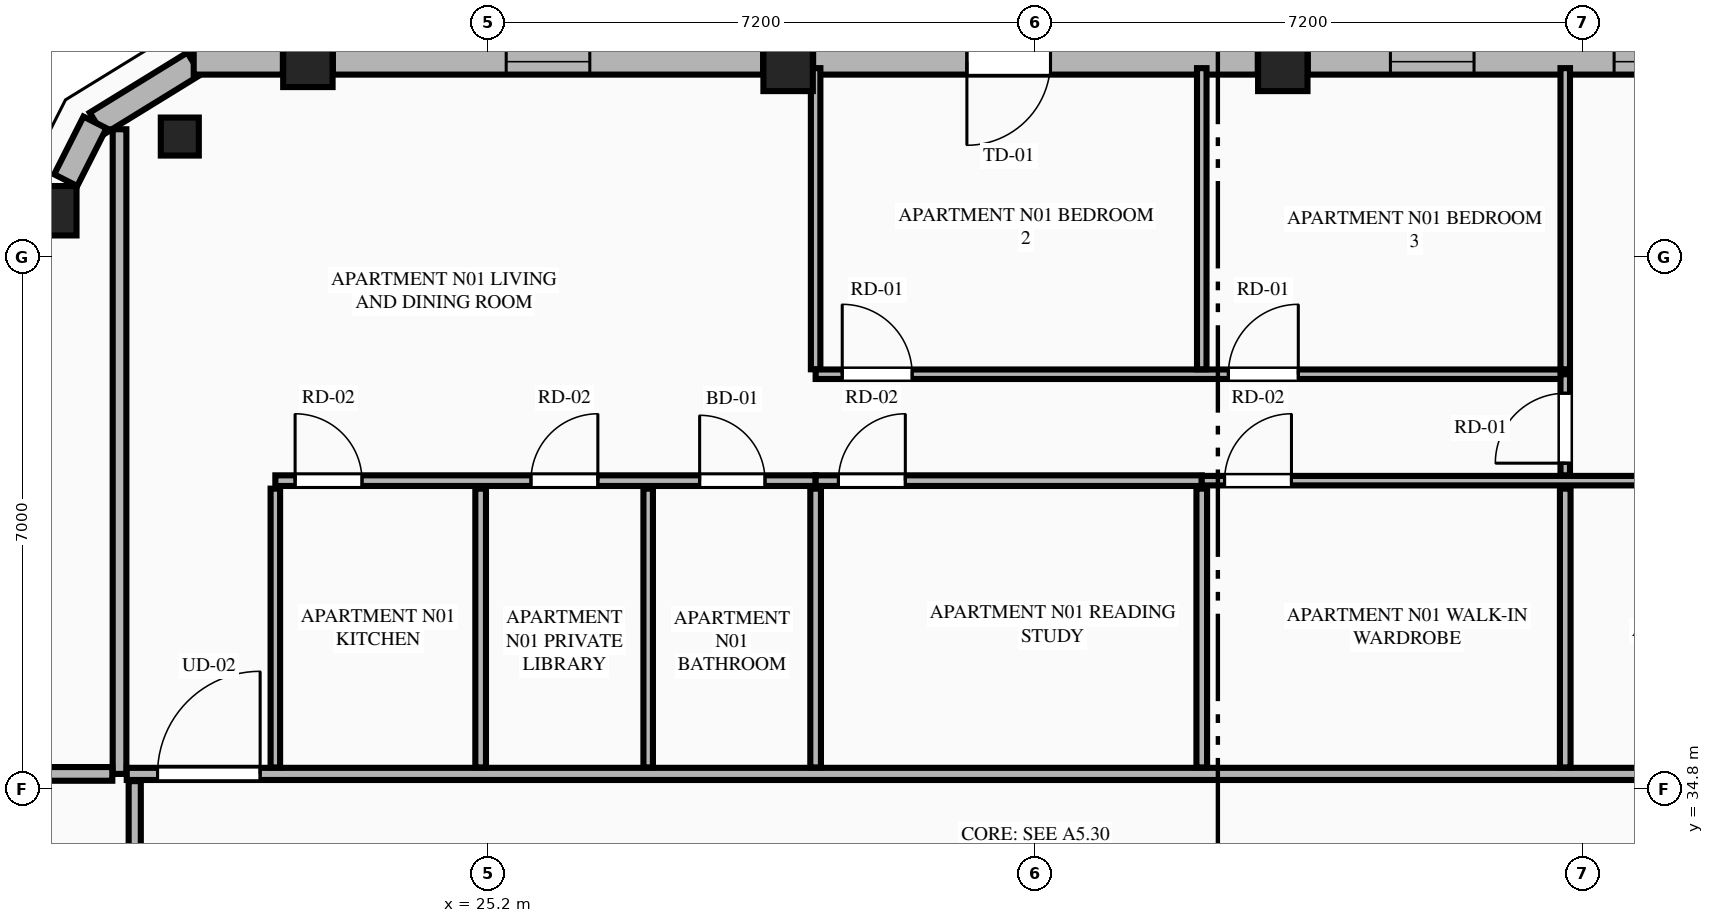
"""IFC4 building model, lengths in metres.
Left out: names, types, materials, properties, quantities, classifications, styles, units other than length and angle.
Written with IfcOpenShell. Run it as: python <this file> out.ifc"""

import sys

from ifc_helpers import new_model, si_unit, direction, frame, frame_2d, origin, origin_2d, place, context, subcontext, project, spatial, rectangle, extrude, element, fill, save


model = new_model("IFC4")
c1 = context("Model", 3, precision=1e-05, world=origin(), true_north=direction((0.0, 1.0)))
c2 = subcontext(c1, "Body", "Model", "MODEL_VIEW")
j1 = project(units=[si_unit("LENGTHUNIT", "METRE"), si_unit("PLANEANGLEUNIT", "RADIAN")], contexts=[c1])
p1 = place(None, origin())
s1 = spatial("IfcSite", under=j1, at=p1, CompositionType="ELEMENT")
p2 = place(p1, origin())
s2 = spatial("IfcBuilding", under=s1, at=p2, CompositionType="ELEMENT")
p3 = place(p2, frame((0.0, 0.0, 291.5)))
s3 = spatial("IfcBuildingStorey", under=s2, at=p3, CompositionType="ELEMENT", Elevation=291.5)
for number, where, z_axis, x_axis in (
    (1, (35.654, 44.308, 0.0), (0.0, 0.0, 1.0), (1.0, 0.0, 0.0)),
    (2, (29.146, 44.308, 0.0), (0.0, 0.0, 1.0), (1.0, 0.0, 0.0)),
    (3, (22.828, 44.361, 0.0), (0.0, 0.0, 1.0), (1.0, 0.0, 0.0)),
    (4, (19.459, 42.409, 0.0), (0.0, 0.0, 1.0), (1.0, 0.0, 0.0)),
):
    element("IfcColumn", number, at=place(p3, frame(where, z_axis=z_axis, x_axis=x_axis)), inside=s3, PredefinedType="COLUMN", context=c2, shape_type="SweptSolid", body=[
        extrude(rectangle(XDim=0.65, YDim=0.65, at=origin_2d()), origin(), (0.0, 0.0, 1.0), 4.0),
    ])
p4 = place(p3, frame((21.143, 43.385, 0.0), z_axis=(0.0, 0.0, 1.0), x_axis=(-0.865256437757, -0.501329529272, 0.0)))
e5 = element("IfcColumn", 5, at=p4, inside=s3, PredefinedType="PILASTER", context=c2, shape_type="SweptSolid", body=[
    extrude(rectangle(XDim=0.5, YDim=0.35, at=origin_2d()), origin(), (0.0, 0.0, 1.0), 4.0),
])
p5 = place(p3, frame((21.331, 44.345, 0.0), z_axis=(0.0, 0.0, 1.0), x_axis=(-0.851680557619, -0.52406128246, 0.0)))
e6 = element("IfcWall", 6, at=p5, inside=s3, PredefinedType="STANDARD", context=c2, shape_type="SweptSolid", body=[
    extrude(rectangle(XDim=1.508, YDim=0.34, at=frame_2d((0.754, 0.0))), origin(), (0.0, 0.0, 1.0), 3.8),
])
p6 = place(p3, frame((41.643, 44.37, 0.0), z_axis=(0.0, 0.0, 1.0), x_axis=(-1.0, 0.0, 0.0)))
e7 = element("IfcWall", 7, at=p6, inside=s3, PredefinedType="STANDARD", context=c2, shape_type="SweptSolid", body=[
    extrude(rectangle(XDim=5.66, YDim=0.34, at=frame_2d((2.83, 0.0))), origin(), (0.0, 0.0, 1.0), 2.99),
])
p7 = place(p6, frame((0.53, 0.0, 0.75)))
e8 = element("IfcOpeningElement", 8, at=p7, cuts=e7, PredefinedType="OPENING", context=c2, shape_type="SweptSolid", body=[
    extrude(rectangle(XDim=1.1, YDim=2.0, at=frame_2d((0.55, 1.0))), frame((0.0, 0.18, 0.0), z_axis=(0.0, -1.0, 0.0), x_axis=(1.0, 0.0, 0.0)), (0.0, 0.0, 1.0), 0.36),
])
p8 = place(p6, frame((3.473, 0.0, 0.75)))
e9 = element("IfcOpeningElement", 9, at=p8, cuts=e7, PredefinedType="OPENING", context=c2, shape_type="SweptSolid", body=[
    extrude(rectangle(XDim=1.1, YDim=2.0, at=frame_2d((0.55, 1.0))), frame((0.0, 0.18, 0.0), z_axis=(0.0, -1.0, 0.0), x_axis=(1.0, 0.0, 0.0)), (0.0, 0.0, 1.0), 0.36),
])
p9 = place(p3, frame((35.325, 44.37, 0.0), z_axis=(0.0, 0.0, 1.0), x_axis=(-1.0, 0.0, 0.0)))
e10 = element("IfcWall", 10, at=p9, inside=s3, PredefinedType="STANDARD", context=c2, shape_type="SweptSolid", body=[
    extrude(rectangle(XDim=5.85, YDim=0.34, at=frame_2d((2.925, 0.0))), origin(), (0.0, 0.0, 1.0), 2.99),
])
p10 = place(p9, frame((2.727, 0.0, 0.0)))
e11 = element("IfcOpeningElement", 11, at=p10, cuts=e10, PredefinedType="OPENING", context=c2, shape_type="SweptSolid", body=[
    extrude(rectangle(XDim=1.1, YDim=2.25, at=frame_2d((0.55, 1.125))), frame((0.0, 0.18, 0.0), z_axis=(0.0, -1.0, 0.0), x_axis=(1.0, 0.0, 0.0)), (0.0, 0.0, 1.0), 0.36),
])
p11 = place(p3, frame((28.817, 44.37, 0.0), z_axis=(0.0, 0.0, 1.0), x_axis=(-1.0, 0.0, 0.0)))
e12 = element("IfcWall", 12, at=p11, inside=s3, PredefinedType="STANDARD", context=c2, shape_type="SweptSolid", body=[
    extrude(rectangle(XDim=5.66, YDim=0.34, at=frame_2d((2.83, 0.0))), origin(), (0.0, 0.0, 1.0), 2.99),
])
p12 = place(p11, frame((2.28, 0.0, 0.75)))
e13 = element("IfcOpeningElement", 13, at=p12, cuts=e12, PredefinedType="OPENING", context=c2, shape_type="SweptSolid", body=[
    extrude(rectangle(XDim=1.1, YDim=2.0, at=frame_2d((0.55, 1.0))), frame((0.0, 0.18, 0.0), z_axis=(0.0, -1.0, 0.0), x_axis=(1.0, 0.0, 0.0)), (0.0, 0.0, 1.0), 0.36),
])
p13 = place(p3, frame((22.499, 44.37, 0.0), z_axis=(0.0, 0.0, 1.0), x_axis=(-1.0, 0.0, 0.0)))
e14 = element("IfcWall", 14, at=p13, inside=s3, PredefinedType="STANDARD", context=c2, shape_type="SweptSolid", body=[
    extrude(rectangle(XDim=1.173, YDim=0.34, at=frame_2d((0.586, 0.0))), origin(), (0.0, 0.0, 1.0), 3.8),
])
p14 = place(p3, frame((20.027, 43.571, 0.0), z_axis=(0.0, 0.0, 1.0), x_axis=(-0.451907025977, -0.8920650424, 0.0)))
e15 = element("IfcWall", 15, at=p14, inside=s3, PredefinedType="STANDARD", context=c2, shape_type="SweptSolid", body=[
    extrude(rectangle(XDim=0.852, YDim=0.34, at=frame_2d((0.426, 0.0))), origin(), (0.0, 0.0, 1.0), 3.8),
])
p15 = place(p3, frame((20.35, 35.0, 0.0), z_axis=(0.0, 0.0, 1.0), x_axis=(0.0, 1.0, 0.0)))
e16 = element("IfcWall", 16, at=p15, inside=s3, PredefinedType="PARTITIONING", context=c2, shape_type="SweptSolid", body=[
    extrude(rectangle(XDim=8.481, YDim=0.18, at=frame_2d((4.24, 0.0))), origin(), (0.0, 0.0, 1.0), 3.8),
])
p16 = place(p3, frame((20.445, 35.0, 0.0), z_axis=(0.0, 0.0, 1.0), x_axis=(1.0, 0.0, 0.0)))
e17 = element("IfcWall", 17, at=p16, inside=s3, PredefinedType="PARTITIONING", context=c2, shape_type="SweptSolid", body=[
    extrude(rectangle(XDim=23.91, YDim=0.16, at=frame_2d((11.955, 0.0))), origin(), (0.0, 0.0, 1.0), 3.8),
])
p17 = place(p16, frame((0.405, 0.0, 0.0)))
e18 = element("IfcOpeningElement", 18, at=p17, cuts=e17, PredefinedType="OPENING", context=c2, shape_type="SweptSolid", body=[
    extrude(rectangle(XDim=1.35, YDim=2.35, at=frame_2d((0.675, 1.175))), frame((0.0, 0.09, 0.0), z_axis=(0.0, -1.0, 0.0), x_axis=(1.0, 0.0, 0.0)), (0.0, 0.0, 1.0), 0.18),
])
p18 = place(p3, frame((22.4, 35.085, 0.0), z_axis=(0.0, 0.0, 1.0), x_axis=(0.0, 1.0, 0.0)))
e19 = element("IfcWall", 19, at=p18, inside=s3, PredefinedType="PARTITIONING", context=c2, shape_type="SweptSolid", body=[
    extrude(rectangle(XDim=3.668, YDim=0.125, at=frame_2d((1.834, 0.0))), origin(), (0.0, 0.0, 1.0), 3.8),
])
p19 = place(p3, frame((22.4, 38.858, 0.0), z_axis=(0.0, 0.0, 1.0), x_axis=(1.0, 0.0, 0.0)))
e20 = element("IfcWall", 20, at=p19, inside=s3, PredefinedType="PLUMBINGWALL", context=c2, shape_type="SweptSolid", body=[
    extrude(rectangle(XDim=7.108, YDim=0.14, at=frame_2d((3.554, 0.0))), origin(), (0.0, 0.0, 1.0), 3.8),
])
p20 = place(p19, frame((5.582, 0.0, 0.0)))
e21 = element("IfcOpeningElement", 21, at=p20, cuts=e20, PredefinedType="OPENING", context=c2, shape_type="SweptSolid", body=[
    extrude(rectangle(XDim=0.86, YDim=2.1, at=frame_2d((0.43, 1.05))), frame((0.0, 0.08, 0.0), z_axis=(0.0, -1.0, 0.0), x_axis=(1.0, 0.0, 0.0)), (0.0, 0.0, 1.0), 0.16),
])
p21 = place(p19, frame((0.26, 0.0, 0.0)))
e22 = element("IfcOpeningElement", 22, at=p21, cuts=e20, PredefinedType="OPENING", context=c2, shape_type="SweptSolid", body=[
    extrude(rectangle(XDim=0.88, YDim=2.15, at=frame_2d((0.44, 1.075))), frame((0.0, 0.08, 0.0), z_axis=(0.0, -1.0, 0.0), x_axis=(1.0, 0.0, 0.0)), (0.0, 0.0, 1.0), 0.16),
])
p22 = place(p19, frame((3.363, 0.0, 0.0)))
e23 = element("IfcOpeningElement", 23, at=p22, cuts=e20, PredefinedType="OPENING", context=c2, shape_type="SweptSolid", body=[
    extrude(rectangle(XDim=0.88, YDim=2.15, at=frame_2d((0.44, 1.075))), frame((0.0, 0.08, 0.0), z_axis=(0.0, -1.0, 0.0), x_axis=(1.0, 0.0, 0.0)), (0.0, 0.0, 1.0), 0.16),
])
p23 = place(p3, frame((29.508, 38.858, 0.0), z_axis=(0.0, 0.0, 1.0), x_axis=(1.0, 0.0, 0.0)))
e24 = element("IfcWall", 24, at=p23, inside=s3, PredefinedType="PLUMBINGWALL", context=c2, shape_type="SweptSolid", body=[
    extrude(rectangle(XDim=5.08, YDim=0.14, at=frame_2d((2.54, 0.0))), origin(), (0.0, 0.0, 1.0), 3.8),
])
p24 = place(p23, frame((0.3, 0.0, 0.0)))
e25 = element("IfcOpeningElement", 25, at=p24, cuts=e24, PredefinedType="OPENING", context=c2, shape_type="SweptSolid", body=[
    extrude(rectangle(XDim=0.88, YDim=2.15, at=frame_2d((0.44, 1.075))), frame((0.0, 0.08, 0.0), z_axis=(0.0, -1.0, 0.0), x_axis=(1.0, 0.0, 0.0)), (0.0, 0.0, 1.0), 0.16),
])
p25 = place(p3, frame((34.588, 38.858, 0.0), z_axis=(0.0, 0.0, 1.0), x_axis=(1.0, 0.0, 0.0)))
e26 = element("IfcWall", 26, at=p25, inside=s3, PredefinedType="PARTITIONING", context=c2, shape_type="SweptSolid", body=[
    extrude(rectangle(XDim=9.767, YDim=0.125, at=frame_2d((4.884, 0.0))), origin(), (0.0, 0.0, 1.0), 3.8),
])
p26 = place(p25, frame((6.849, 0.0, 0.0)))
e27 = element("IfcOpeningElement", 27, at=p26, cuts=e26, PredefinedType="OPENING", context=c2, shape_type="SweptSolid", body=[
    extrude(rectangle(XDim=0.86, YDim=2.1, at=frame_2d((0.43, 1.05))), frame((0.0, 0.073, 0.0), z_axis=(0.0, -1.0, 0.0), x_axis=(1.0, 0.0, 0.0)), (0.0, 0.0, 1.0), 0.145),
])
p27 = place(p25, frame((0.3, 0.0, 0.0)))
e28 = element("IfcOpeningElement", 28, at=p27, cuts=e26, PredefinedType="OPENING", context=c2, shape_type="SweptSolid", body=[
    extrude(rectangle(XDim=0.88, YDim=2.15, at=frame_2d((0.44, 1.075))), frame((0.0, 0.073, 0.0), z_axis=(0.0, -1.0, 0.0), x_axis=(1.0, 0.0, 0.0)), (0.0, 0.0, 1.0), 0.145),
])
p28 = place(p3, frame((25.101, 35.085, 0.0), z_axis=(0.0, 0.0, 1.0), x_axis=(0.0, 1.0, 0.0)))
e29 = element("IfcWall", 29, at=p28, inside=s3, PredefinedType="PLUMBINGWALL", context=c2, shape_type="SweptSolid", body=[
    extrude(rectangle(XDim=3.668, YDim=0.14, at=frame_2d((1.834, 0.0))), origin(), (0.0, 0.0, 1.0), 3.8),
])
p29 = place(p3, frame((27.305, 35.085, 0.0), z_axis=(0.0, 0.0, 1.0), x_axis=(0.0, 1.0, 0.0)))
e30 = element("IfcWall", 30, at=p29, inside=s3, PredefinedType="PARTITIONING", context=c2, shape_type="SweptSolid", body=[
    extrude(rectangle(XDim=3.668, YDim=0.125, at=frame_2d((1.834, 0.0))), origin(), (0.0, 0.0, 1.0), 3.8),
])
p30 = place(p3, frame((29.508, 40.323, 0.0), z_axis=(0.0, 0.0, 1.0), x_axis=(0.0, 1.0, 0.0)))
e31 = element("IfcWall", 31, at=p30, inside=s3, PredefinedType="PARTITIONING", context=c2, shape_type="SweptSolid", body=[
    extrude(rectangle(XDim=3.962, YDim=0.125, at=frame_2d((1.981, 0.0))), origin(), (0.0, 0.0, 1.0), 3.8),
])
p31 = place(p3, frame((29.508, 40.258, 0.0), z_axis=(0.0, 0.0, 1.0), x_axis=(1.0, 0.0, 0.0)))
e32 = element("IfcWall", 32, at=p31, inside=s3, PredefinedType="PARTITIONING", context=c2, shape_type="SweptSolid", body=[
    extrude(rectangle(XDim=9.862, YDim=0.125, at=frame_2d((4.931, 0.0))), origin(), (0.0, 0.0, 1.0), 3.487),
])
p32 = place(p31, frame((0.35, 0.0, 0.0)))
e33 = element("IfcOpeningElement", 33, at=p32, cuts=e32, PredefinedType="OPENING", context=c2, shape_type="SweptSolid", body=[
    extrude(rectangle(XDim=0.92, YDim=2.15, at=frame_2d((0.46, 1.075))), frame((0.0, 0.073, 0.0), z_axis=(0.0, -1.0, 0.0), x_axis=(1.0, 0.0, 0.0)), (0.0, 0.0, 1.0), 0.145),
])
p33 = place(p31, frame((5.43, 0.0, 0.0)))
e34 = element("IfcOpeningElement", 34, at=p33, cuts=e32, PredefinedType="OPENING", context=c2, shape_type="SweptSolid", body=[
    extrude(rectangle(XDim=0.92, YDim=2.15, at=frame_2d((0.46, 1.075))), frame((0.0, 0.073, 0.0), z_axis=(0.0, -1.0, 0.0), x_axis=(1.0, 0.0, 0.0)), (0.0, 0.0, 1.0), 0.145),
])
p34 = place(p3, frame((39.37, 38.928, 0.0), z_axis=(0.0, 0.0, 1.0), x_axis=(0.0, 1.0, 0.0)))
e35 = element("IfcWall", 35, at=p34, inside=s3, PredefinedType="PARTITIONING", context=c2, shape_type="SweptSolid", body=[
    extrude(rectangle(XDim=1.33, YDim=0.125, at=frame_2d((0.665, 0.0))), origin(), (0.0, 0.0, 1.0), 3.8),
])
p35 = place(p34, frame((0.16, 0.0, 0.0)))
e36 = element("IfcOpeningElement", 36, at=p35, cuts=e35, PredefinedType="OPENING", context=c2, shape_type="SweptSolid", body=[
    extrude(rectangle(XDim=0.92, YDim=2.15, at=frame_2d((0.46, 1.075))), frame((0.0, 0.073, 0.0), z_axis=(0.0, -1.0, 0.0), x_axis=(1.0, 0.0, 0.0)), (0.0, 0.0, 1.0), 0.145),
])
for number, where, z_axis, x_axis in (
    (37, (29.508, 35.085, 0.0), (0.0, 0.0, 1.0), (0.0, 1.0, 0.0)),
    (38, (34.588, 35.085, 0.0), (0.0, 0.0, 1.0), (0.0, 1.0, 0.0)),
):
    element("IfcWall", number, at=place(p3, frame(where, z_axis=z_axis, x_axis=x_axis)), inside=s3, PredefinedType="PLUMBINGWALL", context=c2, shape_type="SweptSolid", body=[
        extrude(rectangle(XDim=3.668, YDim=0.14, at=frame_2d((1.834, 0.0))), origin(), (0.0, 0.0, 1.0), 3.8),
    ])
for number, where, z_axis, x_axis in (
    (39, (34.588, 40.323, 0.0), (0.0, 0.0, 1.0), (0.0, 1.0, 0.0)),
    (40, (39.37, 40.323, 0.0), (0.0, 0.0, 1.0), (0.0, 1.0, 0.0)),
):
    element("IfcWall", number, at=place(p3, frame(where, z_axis=z_axis, x_axis=x_axis)), inside=s3, PredefinedType="PARTITIONING", context=c2, shape_type="SweptSolid", body=[
        extrude(rectangle(XDim=3.962, YDim=0.125, at=frame_2d((1.981, 0.0))), origin(), (0.0, 0.0, 1.0), 3.8),
    ])
p36 = place(p3, frame((39.37, 35.085, 0.0), z_axis=(0.0, 0.0, 1.0), x_axis=(0.0, 1.0, 0.0)))
e41 = element("IfcWall", 41, at=p36, inside=s3, PredefinedType="PLUMBINGWALL", context=c2, shape_type="SweptSolid", body=[
    extrude(rectangle(XDim=3.668, YDim=0.14, at=frame_2d((1.834, 0.0))), origin(), (0.0, 0.0, 1.0), 3.8),
])
p37 = place(p3, frame((15.933, 35.0, 0.0), z_axis=(0.0, 0.0, 1.0), x_axis=(1.0, 0.0, 0.0)))
e42 = element("IfcWall", 42, at=p37, inside=s3, PredefinedType="PARTITIONING", context=c2, shape_type="SweptSolid", body=[
    extrude(rectangle(XDim=4.322, YDim=0.18, at=frame_2d((2.161, 0.0))), origin(), (0.0, 0.0, 1.0), 3.8),
])
p38 = place(p3, frame((20.55, 16.495, 0.0), z_axis=(0.0, 0.0, 1.0), x_axis=(0.0, 1.0, 0.0)))
e43 = element("IfcWall", 43, at=p38, inside=s3, PredefinedType="PARTITIONING", context=c2, shape_type="SweptSolid", body=[
    extrude(rectangle(XDim=18.41, YDim=0.16, at=frame_2d((9.205, 0.0))), origin(), (0.0, 0.0, 1.0), 3.487),
])
p39 = place(p38, frame((0.45, 0.0, 0.0)))
e44 = element("IfcOpeningElement", 44, at=p39, cuts=e43, PredefinedType="OPENING", context=c2, shape_type="SweptSolid", body=[
    extrude(rectangle(XDim=1.02, YDim=2.25, at=frame_2d((0.51, 1.125))), frame((0.0, 0.09, 0.0), z_axis=(0.0, -1.0, 0.0), x_axis=(1.0, 0.0, 0.0)), (0.0, 0.0, 1.0), 0.18),
])
p40 = place(p7, origin())
e45 = element("IfcWindow", 45, at=p40, inside=s3, PartitioningType="SINGLE_PANEL", PredefinedType="WINDOW", context=c2, shape_type="SweptSolid", body=[
    extrude(rectangle(XDim=1.1, YDim=2.0, at=frame_2d((0.55, 1.0))), frame((0.0, 0.03, 0.0), z_axis=(0.0, -1.0, 0.0), x_axis=(1.0, 0.0, 0.0)), (0.0, 0.0, 1.0), 0.06),
])
fill(e8, e45)
p41 = place(p10, origin())
e46 = element("IfcDoor", 46, at=p41, inside=s3, OperationType="SINGLE_SWING_RIGHT", PredefinedType="DOOR", context=c2, shape_type="SweptSolid", body=[
    extrude(rectangle(XDim=1.1, YDim=2.25, at=frame_2d((0.55, 1.125))), frame((0.0, 0.025, 0.0), z_axis=(0.0, -1.0, 0.0), x_axis=(1.0, 0.0, 0.0)), (0.0, 0.0, 1.0), 0.05),
])
fill(e11, e46)
p42 = place(p12, origin())
e47 = element("IfcWindow", 47, at=p42, inside=s3, PartitioningType="SINGLE_PANEL", PredefinedType="WINDOW", context=c2, shape_type="SweptSolid", body=[
    extrude(rectangle(XDim=1.1, YDim=2.0, at=frame_2d((0.55, 1.0))), frame((0.0, 0.03, 0.0), z_axis=(0.0, -1.0, 0.0), x_axis=(1.0, 0.0, 0.0)), (0.0, 0.0, 1.0), 0.06),
])
fill(e13, e47)
p43 = place(p20, origin())
e48 = element("IfcDoor", 48, at=p43, inside=s3, OperationType="SINGLE_SWING_LEFT", PredefinedType="DOOR", context=c2, shape_type="SweptSolid", body=[
    extrude(rectangle(XDim=0.86, YDim=2.1, at=frame_2d((0.43, 1.05))), frame((0.0, 0.025, 0.0), z_axis=(0.0, -1.0, 0.0), x_axis=(1.0, 0.0, 0.0)), (0.0, 0.0, 1.0), 0.05),
])
fill(e21, e48)
p44 = place(p17, origin())
e49 = element("IfcDoor", 49, at=p44, inside=s3, OperationType="SINGLE_SWING_RIGHT", PredefinedType="DOOR", context=c2, shape_type="SweptSolid", body=[
    extrude(rectangle(XDim=1.35, YDim=2.35, at=frame_2d((0.675, 1.175))), frame((0.0, 0.025, 0.0), z_axis=(0.0, -1.0, 0.0), x_axis=(1.0, 0.0, 0.0)), (0.0, 0.0, 1.0), 0.05),
])
fill(e18, e49)
p45 = place(p21, origin())
e50 = element("IfcDoor", 50, at=p45, inside=s3, OperationType="SINGLE_SWING_LEFT", PredefinedType="DOOR", context=c2, shape_type="SweptSolid", body=[
    extrude(rectangle(XDim=0.88, YDim=2.15, at=frame_2d((0.44, 1.075))), frame((0.0, 0.025, 0.0), z_axis=(0.0, -1.0, 0.0), x_axis=(1.0, 0.0, 0.0)), (0.0, 0.0, 1.0), 0.05),
])
fill(e22, e50)
p46 = place(p22, origin())
e51 = element("IfcDoor", 51, at=p46, inside=s3, OperationType="SINGLE_SWING_RIGHT", PredefinedType="DOOR", context=c2, shape_type="SweptSolid", body=[
    extrude(rectangle(XDim=0.88, YDim=2.15, at=frame_2d((0.44, 1.075))), frame((0.0, 0.025, 0.0), z_axis=(0.0, -1.0, 0.0), x_axis=(1.0, 0.0, 0.0)), (0.0, 0.0, 1.0), 0.05),
])
fill(e23, e51)
p47 = place(p24, origin())
e52 = element("IfcDoor", 52, at=p47, inside=s3, OperationType="SINGLE_SWING_RIGHT", PredefinedType="DOOR", context=c2, shape_type="SweptSolid", body=[
    extrude(rectangle(XDim=0.88, YDim=2.15, at=frame_2d((0.44, 1.075))), frame((0.0, 0.025, 0.0), z_axis=(0.0, -1.0, 0.0), x_axis=(1.0, 0.0, 0.0)), (0.0, 0.0, 1.0), 0.05),
])
fill(e25, e52)
p48 = place(p32, origin())
e53 = element("IfcDoor", 53, at=p48, inside=s3, OperationType="SINGLE_SWING_LEFT", PredefinedType="DOOR", context=c2, shape_type="SweptSolid", body=[
    extrude(rectangle(XDim=0.92, YDim=2.15, at=frame_2d((0.46, 1.075))), frame((0.0, 0.025, 0.0), z_axis=(0.0, -1.0, 0.0), x_axis=(1.0, 0.0, 0.0)), (0.0, 0.0, 1.0), 0.05),
])
fill(e33, e53)
p49 = place(p33, origin())
e54 = element("IfcDoor", 54, at=p49, inside=s3, OperationType="SINGLE_SWING_RIGHT", PredefinedType="DOOR", context=c2, shape_type="SweptSolid", body=[
    extrude(rectangle(XDim=0.92, YDim=2.15, at=frame_2d((0.46, 1.075))), frame((0.0, 0.025, 0.0), z_axis=(0.0, -1.0, 0.0), x_axis=(1.0, 0.0, 0.0)), (0.0, 0.0, 1.0), 0.05),
])
fill(e34, e54)
p50 = place(p35, origin())
e55 = element("IfcDoor", 55, at=p50, inside=s3, OperationType="SINGLE_SWING_LEFT", PredefinedType="DOOR", context=c2, shape_type="SweptSolid", body=[
    extrude(rectangle(XDim=0.92, YDim=2.15, at=frame_2d((0.46, 1.075))), frame((0.0, 0.025, 0.0), z_axis=(0.0, -1.0, 0.0), x_axis=(1.0, 0.0, 0.0)), (0.0, 0.0, 1.0), 0.05),
])
fill(e36, e55)
p51 = place(p27, origin())
e56 = element("IfcDoor", 56, at=p51, inside=s3, OperationType="SINGLE_SWING_RIGHT", PredefinedType="DOOR", context=c2, shape_type="SweptSolid", body=[
    extrude(rectangle(XDim=0.88, YDim=2.15, at=frame_2d((0.44, 1.075))), frame((0.0, 0.025, 0.0), z_axis=(0.0, -1.0, 0.0), x_axis=(1.0, 0.0, 0.0)), (0.0, 0.0, 1.0), 0.05),
])
fill(e28, e56)
p52 = place(p8, origin())
e57 = element("IfcWindow", 57, at=p52, inside=s3, PartitioningType="SINGLE_PANEL", PredefinedType="WINDOW", context=c2, shape_type="SweptSolid", body=[
    extrude(rectangle(XDim=1.1, YDim=2.0, at=frame_2d((0.55, 1.0))), frame((0.0, 0.03, 0.0), z_axis=(0.0, -1.0, 0.0), x_axis=(1.0, 0.0, 0.0)), (0.0, 0.0, 1.0), 0.06),
])
fill(e9, e57)
save(model, sys.argv[1])
